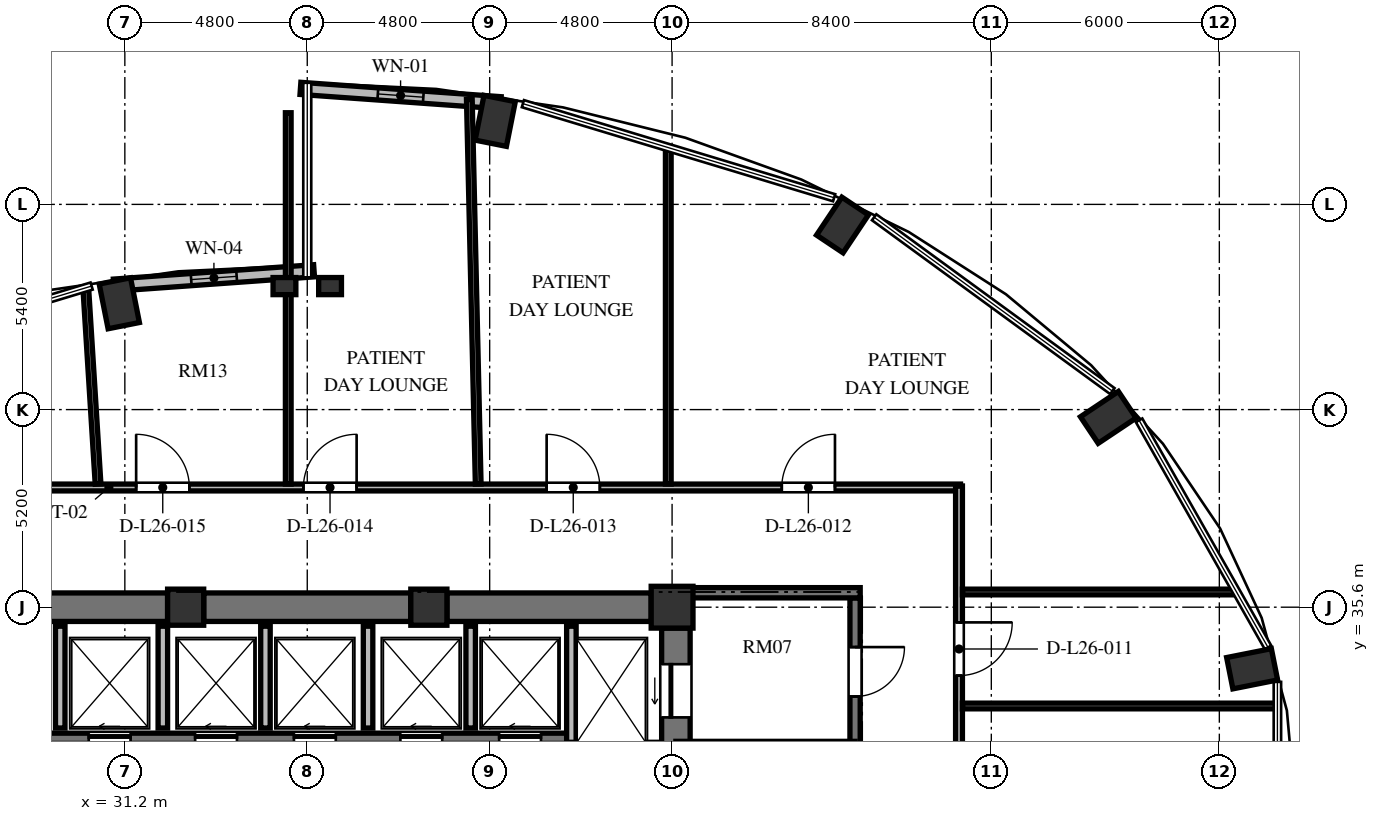
"""IFC4 building model, lengths in metres.
Left out: names, types, materials, properties, quantities, classifications, styles, units other than length and angle.
Written with IfcOpenShell. Run it as: python <this file> out.ifc"""

import sys

from ifc_helpers import new_model, si_unit, direction, frame, frame_2d, origin, origin_2d, place, context, subcontext, project, spatial, rectangle, extrude, element, fill, save


model = new_model("IFC4")
c1 = context("Model", 3, precision=1e-05, world=origin(), true_north=direction((0.0, 1.0)))
c2 = subcontext(c1, "Body", "Model", "MODEL_VIEW")
j1 = project(units=[si_unit("LENGTHUNIT", "METRE"), si_unit("PLANEANGLEUNIT", "RADIAN")], contexts=[c1])
p1 = place(None, origin())
s1 = spatial("IfcSite", under=j1, at=p1, CompositionType="ELEMENT")
p2 = place(p1, origin())
s2 = spatial("IfcBuilding", under=s1, at=p2, CompositionType="ELEMENT")
p3 = place(p2, frame((0.0, 0.0, 103.632)))
s3 = spatial("IfcBuildingStorey", under=s2, at=p3, CompositionType="ELEMENT", Elevation=103.632)
for number, where, z_axis, x_axis in (
    (1, (60.863, 33.98, 0.0), (0.0, 0.0, 1.0), (0.981, 0.195, 0.0)),
    (2, (57.078, 40.595, 0.0), (0.0, 0.0, 1.0), (0.831, 0.556, 0.0)),
    (3, (50.084, 45.657, 0.0), (0.0, 0.0, 1.0), (0.556, 0.831, 0.0)),
    (4, (40.946, 48.397, 0.0), (0.0, 0.0, 1.0), (0.195, 0.981, 0.0)),
    (5, (31.054, 43.597, 0.0), (0.0, 0.0, 1.0), (-0.195, 0.981, 0.0)),
):
    element("IfcColumn", number, at=place(p3, frame(where, z_axis=z_axis, x_axis=x_axis)), inside=s3, PredefinedType="COLUMN", context=c2, shape_type="SweptSolid", body=[
        extrude(rectangle(XDim=1.2, YDim=0.84, at=origin_2d()), origin(), (0.0, 0.0, 1.0), 3.648),
    ])
p4 = place(p3, frame((45.6, 35.6, 0.0), z_axis=(0.0, 0.0, 1.0), x_axis=(1.0, 0.0, 0.0)))
e6 = element("IfcColumn", 6, at=p4, inside=s3, PredefinedType="COLUMN", context=c2, shape_type="SweptSolid", body=[
    extrude(rectangle(XDim=1.1, YDim=1.1, at=origin_2d()), origin(), (0.0, 0.0, 1.0), 3.648),
])
for number, where, z_axis, x_axis in (
    (7, (39.2, 35.6, 0.0), (0.0, 0.0, 1.0), (1.0, 0.0, 0.0)),
    (8, (32.8, 35.6, 0.0), (0.0, 0.0, 1.0), (1.0, 0.0, 0.0)),
):
    element("IfcColumn", number, at=place(p3, frame(where, z_axis=z_axis, x_axis=x_axis)), inside=s3, PredefinedType="COLUMN", context=c2, shape_type="SweptSolid", body=[
        extrude(rectangle(XDim=0.95, YDim=0.95, at=origin_2d()), origin(), (0.0, 0.0, 1.0), 3.648),
    ])
for number, where, z_axis, x_axis in (
    (9, (35.4, 44.05, 0.0), (0.0, 0.0, 1.0), (1.0, 0.0, 0.0)),
    (10, (36.6, 44.05, 0.0), (0.0, 0.0, 1.0), (1.0, 0.0, 0.0)),
):
    element("IfcColumn", number, at=place(p3, frame(where, z_axis=z_axis, x_axis=x_axis)), inside=s3, PredefinedType="PILASTER", context=c2, shape_type="SweptSolid", body=[
        extrude(rectangle(XDim=0.6, YDim=0.45, at=origin_2d()), origin(), (0.0, 0.0, 1.0), 3.648),
    ])
p5 = place(p3, frame((45.7, 20.95, 0.0), z_axis=(0.0, 0.0, 1.0), x_axis=(0.0, 1.0, 0.0)))
e11 = element("IfcWall", 11, at=p5, inside=s3, PredefinedType="SHEAR", context=c2, shape_type="SweptSolid", body=[
    extrude(rectangle(XDim=14.1, YDim=0.75, at=frame_2d((7.05, 0.0))), origin(), (0.0, 0.0, 1.0), 3.648),
])
p6 = place(p5, frame((11.75, 0.0, 0.0)))
e12 = element("IfcOpeningElement", 12, at=p6, cuts=e11, PredefinedType="OPENING", context=c2, shape_type="SweptSolid", body=[
    extrude(rectangle(XDim=1.4, YDim=2.3, at=frame_2d((0.7, 1.15))), frame((0.0, 0.385, 0.0), z_axis=(0.0, -1.0, 0.0), x_axis=(1.0, 0.0, 0.0)), (0.0, 0.0, 1.0), 0.77),
])
p7 = place(p5, frame((0.95, 0.0, 0.0)))
e13 = element("IfcOpeningElement", 13, at=p7, cuts=e11, PredefinedType="OPENING", context=c2, shape_type="SweptSolid", body=[
    extrude(rectangle(XDim=1.4, YDim=2.3, at=frame_2d((0.7, 1.15))), frame((0.0, 0.385, 0.0), z_axis=(0.0, -1.0, 0.0), x_axis=(1.0, 0.0, 0.0)), (0.0, 0.0, 1.0), 0.77),
])
p8 = place(p3, frame((26.95, 35.6, 0.0), z_axis=(0.0, 0.0, 1.0), x_axis=(1.0, 0.0, 0.0)))
e14 = element("IfcWall", 14, at=p8, inside=s3, PredefinedType="SHEAR", context=c2, shape_type="SweptSolid", body=[
    extrude(rectangle(XDim=5.375, YDim=0.75, at=frame_2d((2.688, 0.0))), origin(), (0.0, 0.0, 1.0), 3.648),
])
p9 = place(p3, frame((33.275, 35.6, 0.0), z_axis=(0.0, 0.0, 1.0), x_axis=(1.0, 0.0, 0.0)))
e15 = element("IfcWall", 15, at=p9, inside=s3, PredefinedType="SHEAR", context=c2, shape_type="SweptSolid", body=[
    extrude(rectangle(XDim=5.45, YDim=0.75, at=frame_2d((2.725, 0.0))), origin(), (0.0, 0.0, 1.0), 3.648),
])
p10 = place(p3, frame((39.675, 35.6, 0.0), z_axis=(0.0, 0.0, 1.0), x_axis=(1.0, 0.0, 0.0)))
e16 = element("IfcWall", 16, at=p10, inside=s3, PredefinedType="SHEAR", context=c2, shape_type="SweptSolid", body=[
    extrude(rectangle(XDim=5.375, YDim=0.75, at=frame_2d((2.688, 0.0))), origin(), (0.0, 0.0, 1.0), 3.648),
])
p11 = place(p3, frame((41.091, 48.875, 0.0), z_axis=(0.0, 0.0, 1.0), x_axis=(-0.997432364291, 0.071614793619, 0.0)))
e17 = element("IfcWall", 17, at=p11, inside=s3, PredefinedType="SOLIDWALL", context=c2, shape_type="SweptSolid", body=[
    extrude(rectangle(XDim=5.284, YDim=0.32, at=frame_2d((2.642, 0.0))), origin(), (0.0, 0.0, 1.0), 3.428),
])
p12 = place(p11, frame((2.042, 0.0, 0.85)))
e18 = element("IfcOpeningElement", 18, at=p12, cuts=e17, PredefinedType="OPENING", context=c2, shape_type="SweptSolid", body=[
    extrude(rectangle(XDim=1.2, YDim=2.2, at=frame_2d((0.6, 1.1))), frame((0.0, 0.17, 0.0), z_axis=(0.0, -1.0, 0.0), x_axis=(1.0, 0.0, 0.0)), (0.0, 0.0, 1.0), 0.34),
])
p13 = place(p3, frame((36.179, 44.453, 0.0), z_axis=(0.0, 0.0, 1.0), x_axis=(-0.997431890304, -0.071621394884, 0.0)))
e19 = element("IfcWall", 19, at=p13, inside=s3, PredefinedType="SOLIDWALL", context=c2, shape_type="SweptSolid", body=[
    extrude(rectangle(XDim=5.284, YDim=0.32, at=frame_2d((2.642, 0.0))), origin(), (0.0, 0.0, 1.0), 3.428),
])
p14 = place(p13, frame((2.042, 0.0, 0.85)))
e20 = element("IfcOpeningElement", 20, at=p14, cuts=e19, PredefinedType="OPENING", context=c2, shape_type="SweptSolid", body=[
    extrude(rectangle(XDim=1.2, YDim=1.8, at=frame_2d((0.6, 0.9))), frame((0.0, 0.17, 0.0), z_axis=(0.0, -1.0, 0.0), x_axis=(1.0, 0.0, 0.0)), (0.0, 0.0, 1.0), 0.34),
])
p15 = place(p3, frame((26.55, 32.15, 0.0), z_axis=(0.0, 0.0, 1.0), x_axis=(1.0, 0.0, 0.0)))
e21 = element("IfcWall", 21, at=p15, inside=s3, PredefinedType="SHEAR", context=c2, shape_type="SweptSolid", body=[
    extrude(rectangle(XDim=16.4, YDim=0.27, at=frame_2d((8.2, 0.0))), origin(), (0.0, 0.0, 1.0), 3.648),
])
p16 = place(p15, frame((1.1, 0.0, 0.0)))
e22 = element("IfcOpeningElement", 22, at=p16, cuts=e21, PredefinedType="OPENING", context=c2, shape_type="SweptSolid", body=[
    extrude(rectangle(XDim=1.1, YDim=2.2, at=frame_2d((0.55, 1.1))), frame((0.0, 0.145, 0.0), z_axis=(0.0, -1.0, 0.0), x_axis=(1.0, 0.0, 0.0)), (0.0, 0.0, 1.0), 0.29),
])
p17 = place(p15, frame((3.7, 0.0, 0.0)))
e23 = element("IfcOpeningElement", 23, at=p17, cuts=e21, PredefinedType="OPENING", context=c2, shape_type="SweptSolid", body=[
    extrude(rectangle(XDim=1.1, YDim=2.2, at=frame_2d((0.55, 1.1))), frame((0.0, 0.145, 0.0), z_axis=(0.0, -1.0, 0.0), x_axis=(1.0, 0.0, 0.0)), (0.0, 0.0, 1.0), 0.29),
])
p18 = place(p15, frame((6.5, 0.0, 0.0)))
e24 = element("IfcOpeningElement", 24, at=p18, cuts=e21, PredefinedType="OPENING", context=c2, shape_type="SweptSolid", body=[
    extrude(rectangle(XDim=1.1, YDim=2.2, at=frame_2d((0.55, 1.1))), frame((0.0, 0.145, 0.0), z_axis=(0.0, -1.0, 0.0), x_axis=(1.0, 0.0, 0.0)), (0.0, 0.0, 1.0), 0.29),
])
p19 = place(p15, frame((9.1, 0.0, 0.0)))
e25 = element("IfcOpeningElement", 25, at=p19, cuts=e21, PredefinedType="OPENING", context=c2, shape_type="SweptSolid", body=[
    extrude(rectangle(XDim=1.1, YDim=2.2, at=frame_2d((0.55, 1.1))), frame((0.0, 0.145, 0.0), z_axis=(0.0, -1.0, 0.0), x_axis=(1.0, 0.0, 0.0)), (0.0, 0.0, 1.0), 0.29),
])
p20 = place(p15, frame((11.9, 0.0, 0.0)))
e26 = element("IfcOpeningElement", 26, at=p20, cuts=e21, PredefinedType="OPENING", context=c2, shape_type="SweptSolid", body=[
    extrude(rectangle(XDim=1.1, YDim=2.2, at=frame_2d((0.55, 1.1))), frame((0.0, 0.145, 0.0), z_axis=(0.0, -1.0, 0.0), x_axis=(1.0, 0.0, 0.0)), (0.0, 0.0, 1.0), 0.29),
])
p21 = place(p15, frame((14.5, 0.0, 0.0)))
e27 = element("IfcOpeningElement", 27, at=p21, cuts=e21, PredefinedType="OPENING", context=c2, shape_type="SweptSolid", body=[
    extrude(rectangle(XDim=1.1, YDim=2.2, at=frame_2d((0.55, 1.1))), frame((0.0, 0.145, 0.0), z_axis=(0.0, -1.0, 0.0), x_axis=(1.0, 0.0, 0.0)), (0.0, 0.0, 1.0), 0.29),
])
p22 = place(p3, frame((42.95, 31.92, 0.0), z_axis=(0.0, 0.0, 1.0), x_axis=(0.0, 1.0, 0.0)))
e28 = element("IfcWall", 28, at=p22, inside=s3, PredefinedType="SOLIDWALL", context=c2, shape_type="SweptSolid", body=[
    extrude(rectangle(XDim=3.18, YDim=0.25, at=frame_2d((1.59, 0.0))), origin(), (0.0, 0.0, 1.0), 3.428),
])
for number, where, z_axis, x_axis in (
    (29, (29.5, 32.42, 0.0), (0.0, 0.0, 1.0), (0.0, 1.0, 0.0)),
    (30, (32.2, 32.42, 0.0), (0.0, 0.0, 1.0), (0.0, 1.0, 0.0)),
    (31, (34.9, 32.42, 0.0), (0.0, 0.0, 1.0), (0.0, 1.0, 0.0)),
    (32, (37.6, 32.42, 0.0), (0.0, 0.0, 1.0), (0.0, 1.0, 0.0)),
    (33, (40.3, 32.42, 0.0), (0.0, 0.0, 1.0), (0.0, 1.0, 0.0)),
):
    element("IfcWall", number, at=place(p3, frame(where, z_axis=z_axis, x_axis=x_axis)), inside=s3, PredefinedType="SOLIDWALL", context=c2, shape_type="SweptSolid", body=[
        extrude(rectangle(XDim=2.68, YDim=0.25, at=frame_2d((1.34, 0.0))), origin(), (0.0, 0.0, 1.0), 3.428),
    ])
p23 = place(p3, frame((50.415, 35.845, 0.0), z_axis=(0.0, 0.0, 1.0), x_axis=(0.0, -1.0, 0.0)))
e34 = element("IfcWall", 34, at=p23, inside=s3, PredefinedType="SHEAR", context=c2, shape_type="SweptSolid", body=[
    extrude(rectangle(XDim=15.825, YDim=0.27, at=frame_2d((7.913, 0.0))), origin(), (0.0, 0.0, 1.0), 3.648),
])
p24 = place(p23, frame((4.445, 0.0, 0.0)))
e35 = element("IfcOpeningElement", 35, at=p24, cuts=e34, PredefinedType="OPENING", context=c2, shape_type="SweptSolid", body=[
    extrude(rectangle(XDim=1.2, YDim=2.15, at=frame_2d((0.6, 1.075))), frame((0.0, 0.145, 0.0), z_axis=(0.0, -1.0, 0.0), x_axis=(1.0, 0.0, 0.0)), (0.0, 0.0, 1.0), 0.29),
])
p25 = place(p23, frame((1.295, 0.0, 0.0)))
e36 = element("IfcOpeningElement", 36, at=p25, cuts=e34, PredefinedType="OPENING", context=c2, shape_type="SweptSolid", body=[
    extrude(rectangle(XDim=1.3, YDim=2.2, at=frame_2d((0.65, 1.1))), frame((0.0, 0.145, 0.0), z_axis=(0.0, -1.0, 0.0), x_axis=(1.0, 0.0, 0.0)), (0.0, 0.0, 1.0), 0.29),
])
p26 = place(p23, frame((13.095, 0.0, 0.0)))
e37 = element("IfcOpeningElement", 37, at=p26, cuts=e34, PredefinedType="OPENING", context=c2, shape_type="SweptSolid", body=[
    extrude(rectangle(XDim=1.3, YDim=2.2, at=frame_2d((0.65, 1.1))), frame((0.0, 0.145, 0.0), z_axis=(0.0, -1.0, 0.0), x_axis=(1.0, 0.0, 0.0)), (0.0, 0.0, 1.0), 0.29),
])
p27 = place(p3, frame((46.075, 35.98, 0.0), z_axis=(0.0, 0.0, 1.0), x_axis=(1.0, 0.0, 0.0)))
e38 = element("IfcWall", 38, at=p27, inside=s3, PredefinedType="SHEAR", context=c2, shape_type="SweptSolid", body=[
    extrude(rectangle(XDim=4.475, YDim=0.27, at=frame_2d((2.238, 0.0))), origin(), (0.0, 0.0, 1.0), 3.648),
])
p28 = place(p3, frame((23.31, 38.75, 0.0), z_axis=(0.0, 0.0, 1.0), x_axis=(1.0, 0.0, 0.0)))
e39 = element("IfcWall", 39, at=p28, inside=s3, PredefinedType="PARTITIONING", context=c2, shape_type="SweptSolid", body=[
    extrude(rectangle(XDim=29.88, YDim=0.18, at=frame_2d((14.94, 0.0))), origin(), (0.0, 0.0, 1.0), 3.053),
])
p29 = place(p28, frame((25.176, 0.0, 0.0)))
e40 = element("IfcOpeningElement", 40, at=p29, cuts=e39, PredefinedType="OPENING", context=c2, shape_type="SweptSolid", body=[
    extrude(rectangle(XDim=1.4, YDim=2.2, at=frame_2d((0.7, 1.1))), frame((0.0, 0.1, 0.0), z_axis=(0.0, -1.0, 0.0), x_axis=(1.0, 0.0, 0.0)), (0.0, 0.0, 1.0), 0.2),
])
p30 = place(p28, frame((18.989, 0.0, 0.0)))
e41 = element("IfcOpeningElement", 41, at=p30, cuts=e39, PredefinedType="OPENING", context=c2, shape_type="SweptSolid", body=[
    extrude(rectangle(XDim=1.4, YDim=2.2, at=frame_2d((0.7, 1.1))), frame((0.0, 0.1, 0.0), z_axis=(0.0, -1.0, 0.0), x_axis=(1.0, 0.0, 0.0)), (0.0, 0.0, 1.0), 0.2),
])
p31 = place(p28, frame((12.589, 0.0, 0.0)))
e42 = element("IfcOpeningElement", 42, at=p31, cuts=e39, PredefinedType="OPENING", context=c2, shape_type="SweptSolid", body=[
    extrude(rectangle(XDim=1.4, YDim=2.2, at=frame_2d((0.7, 1.1))), frame((0.0, 0.1, 0.0), z_axis=(0.0, -1.0, 0.0), x_axis=(1.0, 0.0, 0.0)), (0.0, 0.0, 1.0), 0.2),
])
p32 = place(p28, frame((8.188, 0.0, 0.0)))
e43 = element("IfcOpeningElement", 43, at=p32, cuts=e39, PredefinedType="OPENING", context=c2, shape_type="SweptSolid", body=[
    extrude(rectangle(XDim=1.4, YDim=2.2, at=frame_2d((0.7, 1.1))), frame((0.0, 0.1, 0.0), z_axis=(0.0, -1.0, 0.0), x_axis=(1.0, 0.0, 0.0)), (0.0, 0.0, 1.0), 0.2),
])
p33 = place(p3, frame((53.15, 38.79, 0.0), z_axis=(0.0, 0.0, 1.0), x_axis=(0.0, -1.0, 0.0)))
e44 = element("IfcWall", 44, at=p33, inside=s3, PredefinedType="PARTITIONING", context=c2, shape_type="SweptSolid", body=[
    extrude(rectangle(XDim=9.43, YDim=0.18, at=frame_2d((4.715, 0.0))), origin(), (0.0, 0.0, 1.0), 3.428),
])
p34 = place(p33, frame((3.59, 0.0, 0.0)))
e45 = element("IfcOpeningElement", 45, at=p34, cuts=e44, PredefinedType="OPENING", context=c2, shape_type="SweptSolid", body=[
    extrude(rectangle(XDim=1.4, YDim=2.2, at=frame_2d((0.7, 1.1))), frame((0.0, 0.1, 0.0), z_axis=(0.0, -1.0, 0.0), x_axis=(1.0, 0.0, 0.0)), (0.0, 0.0, 1.0), 0.2),
])
p35 = place(p3, frame((53.24, 33.0, 0.0), z_axis=(0.0, 0.0, 1.0), x_axis=(1.0, 0.0, 0.0)))
e46 = element("IfcWall", 46, at=p35, inside=s3, PredefinedType="PARTITIONING", context=c2, shape_type="SweptSolid", body=[
    extrude(rectangle(XDim=8.28, YDim=0.15, at=frame_2d((4.14, 0.0))), origin(), (0.0, 0.0, 1.0), 3.428),
])
p36 = place(p3, frame((53.24, 36.0, 0.0), z_axis=(0.0, 0.0, 1.0), x_axis=(1.0, 0.0, 0.0)))
e47 = element("IfcWall", 47, at=p36, inside=s3, PredefinedType="PARTITIONING", context=c2, shape_type="SweptSolid", body=[
    extrude(rectangle(XDim=7.207, YDim=0.15, at=frame_2d((3.604, 0.0))), origin(), (0.0, 0.0, 1.0), 3.428),
])
p37 = place(p3, frame((30.495, 38.84, 0.0), z_axis=(0.0, 0.0, 1.0), x_axis=(-0.062595600558, 0.998038972581, 0.0)))
e48 = element("IfcWall", 48, at=p37, inside=s3, PredefinedType="PARTITIONING", context=c2, shape_type="SweptSolid", body=[
    extrude(rectangle(XDim=5.176, YDim=0.15, at=frame_2d((2.588, 0.0))), origin(), (0.0, 0.0, 1.0), 3.428),
])
p38 = place(p3, frame((35.5, 38.84, 0.0), z_axis=(0.0, 0.0, 1.0), x_axis=(0.0, 1.0, 0.0)))
e49 = element("IfcWall", 49, at=p38, inside=s3, PredefinedType="PARTITIONING", context=c2, shape_type="SweptSolid", body=[
    extrude(rectangle(XDim=9.772, YDim=0.15, at=frame_2d((4.886, 0.0))), origin(), (0.0, 0.0, 1.0), 3.428),
])
p39 = place(p3, frame((40.498, 38.84, 0.0), z_axis=(0.0, 0.0, 1.0), x_axis=(-0.023053353508, 0.999734236131, 0.0)))
e50 = element("IfcWall", 50, at=p39, inside=s3, PredefinedType="PARTITIONING", context=c2, shape_type="SweptSolid", body=[
    extrude(rectangle(XDim=10.124, YDim=0.15, at=frame_2d((5.062, 0.0))), origin(), (0.0, 0.0, 1.0), 2.813),
])
p40 = place(p3, frame((45.5, 38.84, 0.0), z_axis=(0.0, 0.0, 1.0), x_axis=(0.0, 1.0, 0.0)))
e51 = element("IfcWall", 51, at=p40, inside=s3, PredefinedType="PARTITIONING", context=c2, shape_type="SweptSolid", body=[
    extrude(rectangle(XDim=8.84, YDim=0.15, at=frame_2d((4.42, 0.0))), origin(), (0.0, 0.0, 1.0), 3.428),
])
p41 = place(p12, origin())
e52 = element("IfcWindow", 52, at=p41, inside=s3, PartitioningType="SINGLE_PANEL", PredefinedType="WINDOW", context=c2, shape_type="SweptSolid", body=[
    extrude(rectangle(XDim=1.2, YDim=2.2, at=frame_2d((0.6, 1.1))), frame((0.0, 0.03, 0.0), z_axis=(0.0, -1.0, 0.0), x_axis=(1.0, 0.0, 0.0)), (0.0, 0.0, 1.0), 0.06),
])
fill(e18, e52)
p42 = place(p14, origin())
e53 = element("IfcWindow", 53, at=p42, inside=s3, PartitioningType="SINGLE_PANEL", PredefinedType="WINDOW", context=c2, shape_type="SweptSolid", body=[
    extrude(rectangle(XDim=1.2, YDim=1.8, at=frame_2d((0.6, 0.9))), frame((0.0, 0.03, 0.0), z_axis=(0.0, -1.0, 0.0), x_axis=(1.0, 0.0, 0.0)), (0.0, 0.0, 1.0), 0.06),
])
fill(e20, e53)
p43 = place(p17, origin())
e54 = element("IfcDoor", 54, at=p43, inside=s3, OperationType="SLIDING_TO_LEFT", PredefinedType="DOOR", context=c2, shape_type="SweptSolid", body=[
    extrude(rectangle(XDim=1.1, YDim=2.2, at=frame_2d((0.55, 1.1))), frame((0.0, 0.025, 0.0), z_axis=(0.0, -1.0, 0.0), x_axis=(1.0, 0.0, 0.0)), (0.0, 0.0, 1.0), 0.05),
])
fill(e23, e54)
p44 = place(p18, origin())
e55 = element("IfcDoor", 55, at=p44, inside=s3, OperationType="SLIDING_TO_LEFT", PredefinedType="DOOR", context=c2, shape_type="SweptSolid", body=[
    extrude(rectangle(XDim=1.1, YDim=2.2, at=frame_2d((0.55, 1.1))), frame((0.0, 0.025, 0.0), z_axis=(0.0, -1.0, 0.0), x_axis=(1.0, 0.0, 0.0)), (0.0, 0.0, 1.0), 0.05),
])
fill(e24, e55)
p45 = place(p19, origin())
e56 = element("IfcDoor", 56, at=p45, inside=s3, OperationType="SLIDING_TO_LEFT", PredefinedType="DOOR", context=c2, shape_type="SweptSolid", body=[
    extrude(rectangle(XDim=1.1, YDim=2.2, at=frame_2d((0.55, 1.1))), frame((0.0, 0.025, 0.0), z_axis=(0.0, -1.0, 0.0), x_axis=(1.0, 0.0, 0.0)), (0.0, 0.0, 1.0), 0.05),
])
fill(e25, e56)
p46 = place(p20, origin())
e57 = element("IfcDoor", 57, at=p46, inside=s3, OperationType="SLIDING_TO_LEFT", PredefinedType="DOOR", context=c2, shape_type="SweptSolid", body=[
    extrude(rectangle(XDim=1.1, YDim=2.2, at=frame_2d((0.55, 1.1))), frame((0.0, 0.025, 0.0), z_axis=(0.0, -1.0, 0.0), x_axis=(1.0, 0.0, 0.0)), (0.0, 0.0, 1.0), 0.05),
])
fill(e26, e57)
p47 = place(p21, origin())
e58 = element("IfcDoor", 58, at=p47, inside=s3, OperationType="SLIDING_TO_LEFT", PredefinedType="DOOR", context=c2, shape_type="SweptSolid", body=[
    extrude(rectangle(XDim=1.1, YDim=2.2, at=frame_2d((0.55, 1.1))), frame((0.0, 0.025, 0.0), z_axis=(0.0, -1.0, 0.0), x_axis=(1.0, 0.0, 0.0)), (0.0, 0.0, 1.0), 0.05),
])
fill(e27, e58)
p48 = place(p6, origin())
e59 = element("IfcDoor", 59, at=p48, inside=s3, OperationType="SLIDING_TO_LEFT", PredefinedType="DOOR", context=c2, shape_type="SweptSolid", body=[
    extrude(rectangle(XDim=1.4, YDim=2.3, at=frame_2d((0.7, 1.15))), frame((0.0, 0.025, 0.0), z_axis=(0.0, -1.0, 0.0), x_axis=(1.0, 0.0, 0.0)), (0.0, 0.0, 1.0), 0.05),
])
fill(e12, e59)
p49 = place(p25, origin())
e60 = element("IfcDoor", 60, at=p49, inside=s3, OperationType="SINGLE_SWING_LEFT", PredefinedType="DOOR", context=c2, shape_type="SweptSolid", body=[
    extrude(rectangle(XDim=1.3, YDim=2.2, at=frame_2d((0.65, 1.1))), frame((0.0, 0.025, 0.0), z_axis=(0.0, -1.0, 0.0), x_axis=(1.0, 0.0, 0.0)), (0.0, 0.0, 1.0), 0.05),
])
fill(e36, e60)
p50 = place(p34, origin())
e61 = element("IfcDoor", 61, at=p50, inside=s3, OperationType="SINGLE_SWING_LEFT", PredefinedType="DOOR", context=c2, shape_type="SweptSolid", body=[
    extrude(rectangle(XDim=1.4, YDim=2.2, at=frame_2d((0.7, 1.1))), frame((0.0, 0.025, 0.0), z_axis=(0.0, -1.0, 0.0), x_axis=(1.0, 0.0, 0.0)), (0.0, 0.0, 1.0), 0.05),
])
fill(e45, e61)
p51 = place(p29, origin())
e62 = element("IfcDoor", 62, at=p51, inside=s3, OperationType="SINGLE_SWING_RIGHT", PredefinedType="DOOR", context=c2, shape_type="SweptSolid", body=[
    extrude(rectangle(XDim=1.4, YDim=2.2, at=frame_2d((0.7, 1.1))), frame((0.0, 0.025, 0.0), z_axis=(0.0, -1.0, 0.0), x_axis=(1.0, 0.0, 0.0)), (0.0, 0.0, 1.0), 0.05),
])
fill(e40, e62)
p52 = place(p30, origin())
e63 = element("IfcDoor", 63, at=p52, inside=s3, OperationType="SINGLE_SWING_LEFT", PredefinedType="DOOR", context=c2, shape_type="SweptSolid", body=[
    extrude(rectangle(XDim=1.4, YDim=2.2, at=frame_2d((0.7, 1.1))), frame((0.0, 0.025, 0.0), z_axis=(0.0, -1.0, 0.0), x_axis=(1.0, 0.0, 0.0)), (0.0, 0.0, 1.0), 0.05),
])
fill(e41, e63)
p53 = place(p31, origin())
e64 = element("IfcDoor", 64, at=p53, inside=s3, OperationType="SINGLE_SWING_RIGHT", PredefinedType="DOOR", context=c2, shape_type="SweptSolid", body=[
    extrude(rectangle(XDim=1.4, YDim=2.2, at=frame_2d((0.7, 1.1))), frame((0.0, 0.025, 0.0), z_axis=(0.0, -1.0, 0.0), x_axis=(1.0, 0.0, 0.0)), (0.0, 0.0, 1.0), 0.05),
])
fill(e42, e64)
p54 = place(p32, origin())
e65 = element("IfcDoor", 65, at=p54, inside=s3, OperationType="SINGLE_SWING_LEFT", PredefinedType="DOOR", context=c2, shape_type="SweptSolid", body=[
    extrude(rectangle(XDim=1.4, YDim=2.2, at=frame_2d((0.7, 1.1))), frame((0.0, 0.025, 0.0), z_axis=(0.0, -1.0, 0.0), x_axis=(1.0, 0.0, 0.0)), (0.0, 0.0, 1.0), 0.05),
])
fill(e43, e65)
save(model, sys.argv[1])
